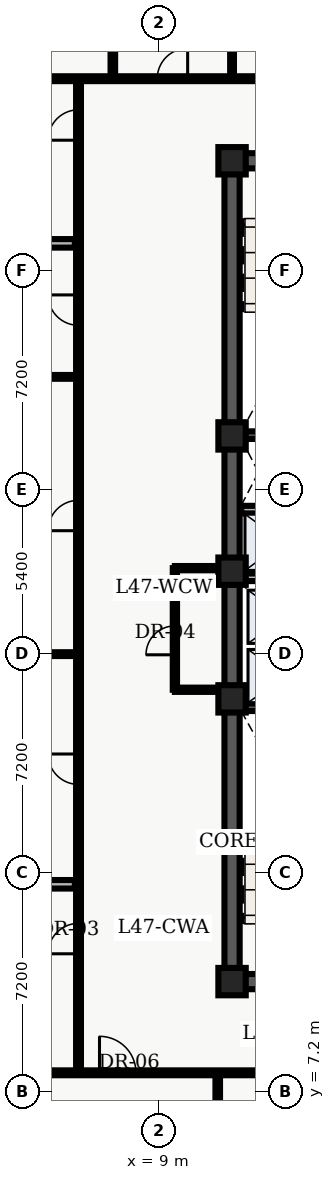
"""IFC4 building model, lengths in metres.
Left out: names, types, materials, properties, quantities, classifications, styles, units other than length and angle.
Written with IfcOpenShell. Run it as: python <this file> out.ifc"""

import sys

from ifc_helpers import new_model, entity, si_unit, converted_unit, direction, frame, origin_with_axes, origin_2d_with_axis, place, context, subcontext, project, spatial, polyline, rectangle, outline, extrude, element, fill, save


model = new_model("IFC4")
c1 = context("Model", 3, precision=1e-05, world=origin_with_axes(), true_north=direction((0.0, 1.0)))
c2 = subcontext(c1, "Body", "Model", "MODEL_VIEW")
j1 = project(units=[si_unit("LENGTHUNIT", "METRE"), converted_unit("PLANEANGLEUNIT", "DEGREE", entity("IfcPlaneAngleMeasure", 0.017), si_unit("PLANEANGLEUNIT", "RADIAN"), dimensions=[0, 0, 0, 0, 0, 0, 0])], contexts=[c1])
p1 = place(None, origin_with_axes())
s1 = spatial("IfcSite", under=j1, at=p1, CompositionType="ELEMENT")
p2 = place(p1, origin_with_axes())
s2 = spatial("IfcBuilding", under=s1, at=p2, CompositionType="ELEMENT")
p3 = place(p2, frame((0.0, 0.0, 192.6), z_axis=(0.0, 0.0, 1.0), x_axis=(1.0, 0.0, 0.0)))
s3 = spatial("IfcBuildingStorey", under=s2, at=p3, CompositionType="ELEMENT", Elevation=192.6)
p4 = place(p3, frame((11.4, 10.8, 0.0), z_axis=(0.0, 0.0, 1.0), x_axis=(0.0, 1.0, 0.0)))
e1 = element("IfcWall", 1, at=p4, inside=s3, PredefinedType="SHEAR", context=c2, shape_type="SweptSolid", body=[
    extrude(outline(polyline([(0.0, -0.25), (27.0, -0.25), (27.0, 0.25), (0.0, 0.25), (0.0, -0.25)])), origin_with_axes(), (0.0, 0.0, 1.0), 3.66),
])
p5 = place(p3, frame((11.4, 10.8, 0.0), z_axis=(0.0, 0.0, 1.0), x_axis=(1.0, 0.0, 0.0)))
e2 = element("IfcWall", 2, at=p5, inside=s3, PredefinedType="SHEAR", context=c2, shape_type="SweptSolid", body=[
    extrude(outline(polyline([(0.0, -0.25), (7.2, -0.25), (7.2, 0.25), (0.0, 0.25), (0.0, -0.25)])), origin_with_axes(), (0.0, 0.0, 1.0), 3.66),
])
p6 = place(p5, frame((2.625, 0.0, 0.0), z_axis=(0.0, 0.0, 1.0), x_axis=(1.0, 0.0, 0.0)))
e3 = element("IfcOpeningElement", 3, at=p6, cuts=e2, PredefinedType="OPENING", context=c2, shape_type="SweptSolid", body=[
    extrude(rectangle(XDim=1.05, YDim=0.52, at=origin_2d_with_axis()), origin_with_axes(), (0.0, 0.0, 1.0), 2.15),
])
p7 = place(p3, frame((11.4, 37.8, 0.0), z_axis=(0.0, 0.0, 1.0), x_axis=(1.0, 0.0, 0.0)))
e4 = element("IfcWall", 4, at=p7, inside=s3, PredefinedType="SHEAR", context=c2, shape_type="SweptSolid", body=[
    extrude(outline(polyline([(0.0, -0.25), (7.2, -0.25), (7.2, 0.25), (0.0, 0.25), (0.0, -0.25)])), origin_with_axes(), (0.0, 0.0, 1.0), 3.66),
])
p8 = place(p7, frame((2.625, 0.0, 0.0), z_axis=(0.0, 0.0, 1.0), x_axis=(1.0, 0.0, 0.0)))
e5 = element("IfcOpeningElement", 5, at=p8, cuts=e4, PredefinedType="OPENING", context=c2, shape_type="SweptSolid", body=[
    extrude(rectangle(XDim=1.05, YDim=0.52, at=origin_2d_with_axis()), origin_with_axes(), (0.0, 0.0, 1.0), 2.15),
])
for number, where, z_axis, x_axis in (
    (6, (11.65, 19.825, 0.0), (0.0, 0.0, 1.0), (1.0, 0.0, 0.0)),
    (7, (11.65, 28.775, 0.0), (0.0, 0.0, 1.0), (1.0, 0.0, 0.0)),
):
    element("IfcWall", number, at=place(p3, frame(where, z_axis=z_axis, x_axis=x_axis)), inside=s3, PredefinedType="SHEAR", context=c2, shape_type="SweptSolid", body=[
        extrude(outline(polyline([(0.0, -0.125), (6.7, -0.125), (6.7, 0.125), (0.0, 0.125), (0.0, -0.125)])), origin_with_axes(), (0.0, 0.0, 1.0), 3.66),
    ])
p9 = place(p3, frame((11.7, 24.1, 0.0), z_axis=(0.0, 0.0, 1.0), x_axis=(1.0, 0.0, 0.0)))
e8 = element("IfcWall", 8, at=p9, inside=s3, PredefinedType="SOLIDWALL", context=c2, shape_type="SweptSolid", body=[
    extrude(outline(polyline([(0.0, -0.125), (6.6, -0.125), (6.6, 0.125), (0.0, 0.125), (0.0, -0.125)])), origin_with_axes(), (0.0, 0.0, 1.0), 2.7),
])
p10 = place(p9, frame((3.75, 0.0, 0.0), z_axis=(0.0, 0.0, 1.0), x_axis=(1.0, 0.0, 0.0)))
e9 = element("IfcOpeningElement", 9, at=p10, cuts=e8, PredefinedType="OPENING", context=c2, shape_type="SweptSolid", body=[
    extrude(rectangle(XDim=0.9, YDim=0.27, at=origin_2d_with_axis()), origin_with_axes(), (0.0, 0.0, 1.0), 2.15),
])
p11 = place(p3, frame((11.7, 26.325, 0.0), z_axis=(0.0, 0.0, 1.0), x_axis=(1.0, 0.0, 0.0)))
e10 = element("IfcWall", 10, at=p11, inside=s3, PredefinedType="SOLIDWALL", context=c2, shape_type="SweptSolid", body=[
    extrude(outline(polyline([(0.0, -0.125), (6.6, -0.125), (6.6, 0.125), (0.0, 0.125), (0.0, -0.125)])), origin_with_axes(), (0.0, 0.0, 1.0), 2.7),
])
p12 = place(p11, frame((3.5, 0.0, 0.0), z_axis=(0.0, 0.0, 1.0), x_axis=(1.0, 0.0, 0.0)))
e11 = element("IfcOpeningElement", 11, at=p12, cuts=e10, PredefinedType="OPENING", context=c2, shape_type="SweptSolid", body=[
    extrude(rectangle(XDim=0.9, YDim=0.27, at=origin_2d_with_axis()), origin_with_axes(), (0.0, 0.0, 1.0), 2.15),
])
for number, where, z_axis, x_axis in (
    (12, (11.4, 10.8, 0.0), (0.0, 0.0, 1.0), (1.0, 0.0, 0.0)),
    (13, (11.4, 20.1, 0.0), (0.0, 0.0, 1.0), (1.0, 0.0, 0.0)),
    (14, (11.4, 24.3, 0.0), (0.0, 0.0, 1.0), (1.0, 0.0, 0.0)),
    (15, (11.4, 28.75, 0.0), (0.0, 0.0, 1.0), (1.0, 0.0, 0.0)),
    (16, (11.4, 37.8, 0.0), (0.0, 0.0, 1.0), (1.0, 0.0, 0.0)),
):
    element("IfcColumn", number, at=place(p3, frame(where, z_axis=z_axis, x_axis=x_axis)), inside=s3, PredefinedType="COLUMN", context=c2, shape_type="SweptSolid", body=[
        extrude(rectangle(XDim=0.9, YDim=0.9, at=origin_2d_with_axis()), origin_with_axes(), (0.0, 0.0, 1.0), 3.9),
    ])
p13 = place(p3, frame((9.52, 20.4, 0.0), z_axis=(0.0, 0.0, 1.0), x_axis=(0.0, 1.0, 0.0)))
e17 = element("IfcWall", 17, at=p13, inside=s3, PredefinedType="PARTITIONING", context=c2, shape_type="SweptSolid", body=[
    extrude(outline(polyline([(0.0, -0.07), (4.0, -0.07), (4.0, 0.07), (0.0, 0.07), (0.0, -0.07)])), origin_with_axes(), (0.0, 0.0, 1.0), 2.7),
])
p14 = place(p13, frame((1.625, 0.0, 0.0), z_axis=(0.0, 0.0, 1.0), x_axis=(1.0, 0.0, 0.0)))
e18 = element("IfcOpeningElement", 18, at=p14, cuts=e17, PredefinedType="OPENING", context=c2, shape_type="SweptSolid", body=[
    extrude(rectangle(XDim=0.95, YDim=0.16, at=origin_2d_with_axis()), origin_with_axes(), (0.0, 0.0, 1.0), 2.15),
])
for number, where, z_axis, x_axis in (
    (19, (9.52, 20.4, 0.0), (0.0, 0.0, 1.0), (1.0, 0.0, 0.0)),
    (20, (9.52, 24.4, 0.0), (0.0, 0.0, 1.0), (1.0, 0.0, 0.0)),
):
    element("IfcWall", number, at=place(p3, frame(where, z_axis=z_axis, x_axis=x_axis)), inside=s3, PredefinedType="PARTITIONING", context=c2, shape_type="SweptSolid", body=[
        extrude(outline(polyline([(0.0, -0.07), (1.58, -0.07), (1.58, 0.07), (0.0, 0.07), (0.0, -0.07)])), origin_with_axes(), (0.0, 0.0, 1.0), 2.7),
    ])
p15 = place(p3, frame((2.6, 7.8, 0.0), z_axis=(0.0, 0.0, 1.0), x_axis=(1.0, 0.0, 0.0)))
e21 = element("IfcWall", 21, at=p15, inside=s3, PredefinedType="PARTITIONING", context=c2, shape_type="SweptSolid", body=[
    extrude(outline(polyline([(0.0, -0.08), (18.55, -0.08), (18.55, 0.08), (0.0, 0.08), (0.0, -0.08)])), origin_with_axes(), (0.0, 0.0, 1.0), 2.7),
])
p16 = place(p15, frame((5.04, 0.0, 0.0), z_axis=(0.0, 0.0, 1.0), x_axis=(1.0, 0.0, 0.0)))
e22 = element("IfcOpeningElement", 22, at=p16, cuts=e21, PredefinedType="OPENING", context=c2, shape_type="SweptSolid", body=[
    extrude(rectangle(XDim=1.2, YDim=0.18, at=origin_2d_with_axis()), origin_with_axes(), (0.0, 0.0, 1.0), 2.2),
])
p17 = place(p15, frame((13.415, 0.0, 0.0), z_axis=(0.0, 0.0, 1.0), x_axis=(1.0, 0.0, 0.0)))
e23 = element("IfcOpeningElement", 23, at=p17, cuts=e21, PredefinedType="OPENING", context=c2, shape_type="SweptSolid", body=[
    extrude(rectangle(XDim=1.0, YDim=0.18, at=origin_2d_with_axis()), origin_with_axes(), (0.0, 0.0, 1.0), 2.15),
])
p18 = place(p3, frame((2.6, 40.5, 0.0), z_axis=(0.0, 0.0, 1.0), x_axis=(1.0, 0.0, 0.0)))
e24 = element("IfcWall", 24, at=p18, inside=s3, PredefinedType="PARTITIONING", context=c2, shape_type="SweptSolid", body=[
    extrude(outline(polyline([(0.0, -0.08), (24.746, -0.08), (24.746, 0.08), (0.0, 0.08), (0.0, -0.08)])), origin_with_axes(), (0.0, 0.0, 1.0), 2.7),
])
p19 = place(p18, frame((1.554, 0.0, 0.0), z_axis=(0.0, 0.0, 1.0), x_axis=(1.0, 0.0, 0.0)))
e25 = element("IfcOpeningElement", 25, at=p19, cuts=e24, PredefinedType="OPENING", context=c2, shape_type="SweptSolid", body=[
    extrude(rectangle(XDim=1.0, YDim=0.18, at=origin_2d_with_axis()), origin_with_axes(), (0.0, 0.0, 1.0), 2.15),
])
p20 = place(p18, frame((6.84, 0.0, 0.0), z_axis=(0.0, 0.0, 1.0), x_axis=(1.0, 0.0, 0.0)))
e26 = element("IfcOpeningElement", 26, at=p20, cuts=e24, PredefinedType="OPENING", context=c2, shape_type="SweptSolid", body=[
    extrude(rectangle(XDim=1.0, YDim=0.18, at=origin_2d_with_axis()), origin_with_axes(), (0.0, 0.0, 1.0), 2.15),
])
p21 = place(p18, frame((11.276, 0.0, 0.0), z_axis=(0.0, 0.0, 1.0), x_axis=(1.0, 0.0, 0.0)))
e27 = element("IfcOpeningElement", 27, at=p21, cuts=e24, PredefinedType="OPENING", context=c2, shape_type="SweptSolid", body=[
    extrude(rectangle(XDim=1.0, YDim=0.18, at=origin_2d_with_axis()), origin_with_axes(), (0.0, 0.0, 1.0), 2.15),
])
p22 = place(p18, frame((15.636, 0.0, 0.0), z_axis=(0.0, 0.0, 1.0), x_axis=(1.0, 0.0, 0.0)))
e28 = element("IfcOpeningElement", 28, at=p22, cuts=e24, PredefinedType="OPENING", context=c2, shape_type="SweptSolid", body=[
    extrude(rectangle(XDim=1.0, YDim=0.18, at=origin_2d_with_axis()), origin_with_axes(), (0.0, 0.0, 1.0), 2.15),
])
p23 = place(p3, frame((6.35, 7.8, 0.0), z_axis=(0.0, 0.0, 1.0), x_axis=(0.0, 1.0, 0.0)))
e29 = element("IfcWall", 29, at=p23, inside=s3, PredefinedType="PARTITIONING", context=c2, shape_type="SweptSolid", body=[
    extrude(outline(polyline([(0.0, -0.08), (32.7, -0.08), (32.7, 0.08), (0.0, 0.08), (0.0, -0.08)])), origin_with_axes(), (0.0, 0.0, 1.0), 2.7),
])
p24 = place(p23, frame((4.415, 0.0, 0.0), z_axis=(0.0, 0.0, 1.0), x_axis=(1.0, 0.0, 0.0)))
e30 = element("IfcOpeningElement", 30, at=p24, cuts=e29, PredefinedType="OPENING", context=c2, shape_type="SweptSolid", body=[
    extrude(rectangle(XDim=1.0, YDim=0.18, at=origin_2d_with_axis()), origin_with_axes(), (0.0, 0.0, 1.0), 2.15),
])
p25 = place(p23, frame((9.986, 0.0, 0.0), z_axis=(0.0, 0.0, 1.0), x_axis=(1.0, 0.0, 0.0)))
e31 = element("IfcOpeningElement", 31, at=p25, cuts=e29, PredefinedType="OPENING", context=c2, shape_type="SweptSolid", body=[
    extrude(rectangle(XDim=1.0, YDim=0.18, at=origin_2d_with_axis()), origin_with_axes(), (0.0, 0.0, 1.0), 2.15),
])
p26 = place(p23, frame((18.332, 0.0, 0.0), z_axis=(0.0, 0.0, 1.0), x_axis=(1.0, 0.0, 0.0)))
e32 = element("IfcOpeningElement", 32, at=p26, cuts=e29, PredefinedType="OPENING", context=c2, shape_type="SweptSolid", body=[
    extrude(rectangle(XDim=1.0, YDim=0.18, at=origin_2d_with_axis()), origin_with_axes(), (0.0, 0.0, 1.0), 2.15),
])
p27 = place(p23, frame((25.088, 0.0, 0.0), z_axis=(0.0, 0.0, 1.0), x_axis=(1.0, 0.0, 0.0)))
e33 = element("IfcOpeningElement", 33, at=p27, cuts=e29, PredefinedType="OPENING", context=c2, shape_type="SweptSolid", body=[
    extrude(rectangle(XDim=1.0, YDim=0.18, at=origin_2d_with_axis()), origin_with_axes(), (0.0, 0.0, 1.0), 2.15),
])
p28 = place(p23, frame((31.177, 0.0, 0.0), z_axis=(0.0, 0.0, 1.0), x_axis=(1.0, 0.0, 0.0)))
e34 = element("IfcOpeningElement", 34, at=p28, cuts=e29, PredefinedType="OPENING", context=c2, shape_type="SweptSolid", body=[
    extrude(rectangle(XDim=1.0, YDim=0.18, at=origin_2d_with_axis()), origin_with_axes(), (0.0, 0.0, 1.0), 2.15),
])
p29 = place(p3, frame((0.335, 14.001, 0.0), z_axis=(0.0, 0.0, 1.0), x_axis=(1.0, 0.0, 0.0)))
e35 = element("IfcWall", 35, at=p29, inside=s3, PredefinedType="PARTITIONING", context=c2, shape_type="SweptSolid", body=[
    extrude(outline(polyline([(0.0, -0.14), (5.895, -0.14), (5.895, 0.14), (0.0, 0.14), (0.0, -0.14)])), origin_with_axes(), (0.0, 0.0, 1.0), 2.7),
])
for number, where, z_axis, x_axis in (
    (36, (0.335, 21.572, 0.0), (0.0, 0.0, 1.0), (1.0, 0.0, 0.0)),
    (37, (0.335, 30.692, 0.0), (0.0, 0.0, 1.0), (1.0, 0.0, 0.0)),
):
    element("IfcWall", number, at=place(p3, frame(where, z_axis=z_axis, x_axis=x_axis)), inside=s3, PredefinedType="PARTITIONING", context=c2, shape_type="SweptSolid", body=[
        extrude(outline(polyline([(0.0, -0.062), (5.895, -0.062), (5.895, 0.062), (0.0, 0.062), (0.0, -0.062)])), origin_with_axes(), (0.0, 0.0, 1.0), 2.7),
    ])
p30 = place(p3, frame((0.335, 35.084, 0.0), z_axis=(0.0, 0.0, 1.0), x_axis=(1.0, 0.0, 0.0)))
e38 = element("IfcWall", 38, at=p30, inside=s3, PredefinedType="PARTITIONING", context=c2, shape_type="SweptSolid", body=[
    extrude(outline(polyline([(0.0, -0.14), (5.895, -0.14), (5.895, 0.14), (0.0, 0.14), (0.0, -0.14)])), origin_with_axes(), (0.0, 0.0, 1.0), 2.7),
])
p31 = place(p3, frame((10.929, 0.335, 0.0), z_axis=(0.0, 0.0, 1.0), x_axis=(0.0, 1.0, 0.0)))
e39 = element("IfcWall", 39, at=p31, inside=s3, PredefinedType="PARTITIONING", context=c2, shape_type="SweptSolid", body=[
    extrude(outline(polyline([(0.0, -0.075), (7.365, -0.075), (7.365, 0.075), (0.0, 0.075), (0.0, -0.075)])), origin_with_axes(), (0.0, 0.0, 1.0), 2.7),
])
p32 = place(p3, frame((7.479, 40.6, 0.0), z_axis=(0.0, 0.0, 1.0), x_axis=(0.0, 1.0, 0.0)))
e40 = element("IfcWall", 40, at=p32, inside=s3, PredefinedType="PARTITIONING", context=c2, shape_type="SweptSolid", body=[
    extrude(outline(polyline([(0.0, -0.075), (7.665, -0.075), (7.665, 0.075), (0.0, 0.075), (0.0, -0.075)])), origin_with_axes(), (0.0, 0.0, 1.0), 2.7),
])
p33 = place(p3, frame((11.4, 40.6, 0.0), z_axis=(0.0, 0.0, 1.0), x_axis=(0.0, 1.0, 0.0)))
e41 = element("IfcWall", 41, at=p33, inside=s3, PredefinedType="PARTITIONING", context=c2, shape_type="SweptSolid", body=[
    extrude(outline(polyline([(0.0, -0.062), (7.665, -0.062), (7.665, 0.062), (0.0, 0.062), (0.0, -0.062)])), origin_with_axes(), (0.0, 0.0, 1.0), 2.7),
])
p34 = place(p13, frame((1.625, 0.0, 0.0), z_axis=(0.0, 0.0, 1.0), x_axis=(1.0, 0.0, 0.0)))
e42 = element("IfcDoor", 42, at=p34, inside=s3, OperationType="SINGLE_SWING_LEFT", PredefinedType="DOOR", context=c2, shape_type="SweptSolid", body=[
    extrude(rectangle(XDim=0.95, YDim=0.084, at=origin_2d_with_axis()), origin_with_axes(), (0.0, 0.0, 1.0), 2.15),
])
fill(e18, e42)
p35 = place(p23, frame((4.415, 0.0, 0.0), z_axis=(0.0, 0.0, 1.0), x_axis=(1.0, 0.0, 0.0)))
e43 = element("IfcDoor", 43, at=p35, inside=s3, OperationType="SINGLE_SWING_LEFT", PredefinedType="DOOR", context=c2, shape_type="SweptSolid", body=[
    extrude(rectangle(XDim=1.0, YDim=0.09, at=origin_2d_with_axis()), origin_with_axes(), (0.0, 0.0, 1.0), 2.15),
])
fill(e30, e43)
p36 = place(p23, frame((9.986, 0.0, 0.0), z_axis=(0.0, 0.0, 1.0), x_axis=(1.0, 0.0, 0.0)))
e44 = element("IfcDoor", 44, at=p36, inside=s3, OperationType="SINGLE_SWING_RIGHT", PredefinedType="DOOR", context=c2, shape_type="SweptSolid", body=[
    extrude(rectangle(XDim=1.0, YDim=0.09, at=origin_2d_with_axis()), origin_with_axes(), (0.0, 0.0, 1.0), 2.15),
])
fill(e31, e44)
p37 = place(p23, frame((18.332, 0.0, 0.0), z_axis=(0.0, 0.0, 1.0), x_axis=(1.0, 0.0, 0.0)))
e45 = element("IfcDoor", 45, at=p37, inside=s3, OperationType="SINGLE_SWING_LEFT", PredefinedType="DOOR", context=c2, shape_type="SweptSolid", body=[
    extrude(rectangle(XDim=1.0, YDim=0.09, at=origin_2d_with_axis()), origin_with_axes(), (0.0, 0.0, 1.0), 2.15),
])
fill(e32, e45)
p38 = place(p23, frame((25.088, 0.0, 0.0), z_axis=(0.0, 0.0, 1.0), x_axis=(1.0, 0.0, 0.0)))
e46 = element("IfcDoor", 46, at=p38, inside=s3, OperationType="SINGLE_SWING_RIGHT", PredefinedType="DOOR", context=c2, shape_type="SweptSolid", body=[
    extrude(rectangle(XDim=1.0, YDim=0.09, at=origin_2d_with_axis()), origin_with_axes(), (0.0, 0.0, 1.0), 2.15),
])
fill(e33, e46)
p39 = place(p23, frame((31.177, 0.0, 0.0), z_axis=(0.0, 0.0, 1.0), x_axis=(1.0, 0.0, 0.0)))
e47 = element("IfcDoor", 47, at=p39, inside=s3, OperationType="SINGLE_SWING_LEFT", PredefinedType="DOOR", context=c2, shape_type="SweptSolid", body=[
    extrude(rectangle(XDim=1.0, YDim=0.09, at=origin_2d_with_axis()), origin_with_axes(), (0.0, 0.0, 1.0), 2.15),
])
fill(e34, e47)
p40 = place(p15, frame((5.04, 0.0, 0.0), z_axis=(0.0, 0.0, 1.0), x_axis=(1.0, 0.0, 0.0)))
e48 = element("IfcDoor", 48, at=p40, inside=s3, OperationType="SINGLE_SWING_LEFT", PredefinedType="DOOR", context=c2, shape_type="SweptSolid", body=[
    extrude(rectangle(XDim=1.2, YDim=0.09, at=origin_2d_with_axis()), origin_with_axes(), (0.0, 0.0, 1.0), 2.2),
])
fill(e22, e48)
p41 = place(p18, frame((6.84, 0.0, 0.0), z_axis=(0.0, 0.0, 1.0), x_axis=(1.0, 0.0, 0.0)))
e49 = element("IfcDoor", 49, at=p41, inside=s3, OperationType="SINGLE_SWING_RIGHT", PredefinedType="DOOR", context=c2, shape_type="SweptSolid", body=[
    extrude(rectangle(XDim=1.0, YDim=0.09, at=origin_2d_with_axis()), origin_with_axes(), (0.0, 0.0, 1.0), 2.15),
])
fill(e26, e49)
save(model, sys.argv[1])
